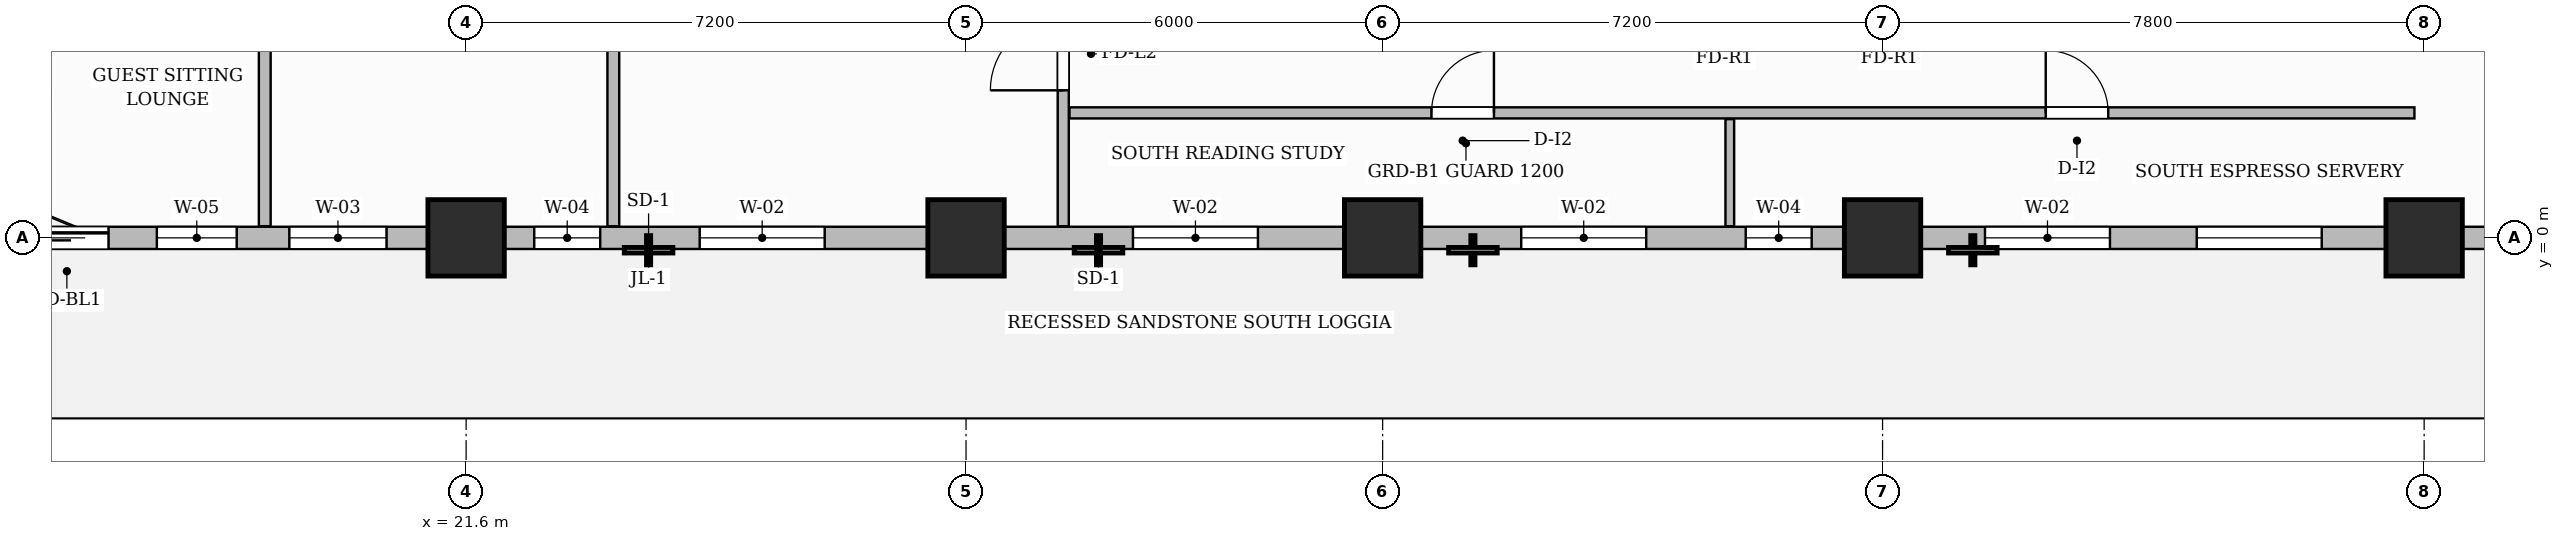
"""IFC4 building model, lengths in metres.
Left out: names, types, materials, properties, quantities, classifications, styles, units other than length and angle.
Written with IfcOpenShell. Run it as: python <this file> out.ifc"""

import sys

from ifc_helpers import new_model, si_unit, direction, frame, frame_2d, origin, origin_2d, place, context, subcontext, project, spatial, rectangle, extrude, source, transform, mapped, element, fill, save


model = new_model("IFC4")
c1 = context("Model", 3, precision=1e-05, world=origin(), true_north=direction((0.0, 1.0)))
c2 = subcontext(c1, "Body", "Model", "MODEL_VIEW")
j1 = project(units=[si_unit("LENGTHUNIT", "METRE"), si_unit("PLANEANGLEUNIT", "RADIAN")], contexts=[c1])
p1 = place(None, origin())
s1 = spatial("IfcSite", under=j1, at=p1, CompositionType="ELEMENT")
p2 = place(p1, origin())
s2 = spatial("IfcBuilding", under=s1, at=p2, CompositionType="ELEMENT")
p3 = place(p2, frame((0.0, 0.0, 99.0)))
s3 = spatial("IfcBuildingStorey", under=s2, at=p3, CompositionType="ELEMENT", Elevation=99.0)
m1 = source(origin(), c2, "Body", "SweptSolid", [
    extrude(rectangle(XDim=1.1, YDim=1.1, at=origin_2d()), origin(), (0.0, 0.0, 1.0), 3.7),
])
for number, where, z_axis, x_axis in (
    (1, (21.6, 0.0, 0.0), (0.0, 0.0, 1.0), (1.0, 0.0, 0.0)),
    (2, (28.8, 0.0, 0.0), (0.0, 0.0, 1.0), (1.0, 0.0, 0.0)),
    (3, (34.8, 0.0, 0.0), (0.0, 0.0, 1.0), (1.0, 0.0, 0.0)),
    (4, (42.0, 0.0, 0.0), (0.0, 0.0, 1.0), (1.0, 0.0, 0.0)),
    (5, (49.8, 0.0, 0.0), (0.0, 0.0, 1.0), (1.0, 0.0, 0.0)),
):
    element("IfcColumn", number, at=place(p3, frame(where, z_axis=z_axis, x_axis=x_axis)), inside=s3, PredefinedType="COLUMN", context=c2, shape_type="MappedRepresentation", body=[
        mapped(m1, transform((0.0, 0.0, 0.0), scale=1.0)),
    ])
p4 = place(p3, frame((30.2, 0.168, 0.0), z_axis=(0.0, 0.0, 1.0), x_axis=(0.0, 1.0, 0.0)))
e6 = element("IfcWall", 6, at=p4, inside=s3, PredefinedType="PARTITIONING", context=c2, shape_type="SweptSolid", body=[
    extrude(rectangle(XDim=8.892, YDim=0.16, at=frame_2d((4.446, 0.0))), origin(), (0.0, 0.0, 1.0), 3.45),
])
p5 = place(p4, frame((1.957, 0.0, 0.0)))
e7 = element("IfcOpeningElement", 7, at=p5, cuts=e6, PredefinedType="OPENING", context=c2, shape_type="SweptSolid", body=[
    extrude(rectangle(XDim=1.05, YDim=2.15, at=frame_2d((0.525, 1.075))), frame((0.0, 0.09, 0.0), z_axis=(0.0, -1.0, 0.0), x_axis=(1.0, 0.0, 0.0)), (0.0, 0.0, 1.0), 0.18),
])
p6 = place(p3, frame((30.29, 1.8, 0.0), z_axis=(0.0, 0.0, 1.0), x_axis=(1.0, 0.0, 0.0)))
e8 = element("IfcWall", 8, at=p6, inside=s3, PredefinedType="PARTITIONING", context=c2, shape_type="SweptSolid", body=[
    extrude(rectangle(XDim=19.37, YDim=0.16, at=frame_2d((9.685, 0.0))), origin(), (0.0, 0.0, 1.0), 3.45),
])
p7 = place(p6, frame((5.213, 0.0, 0.0)))
e9 = element("IfcOpeningElement", 9, at=p7, cuts=e8, PredefinedType="OPENING", context=c2, shape_type="SweptSolid", body=[
    extrude(rectangle(XDim=0.9, YDim=2.15, at=frame_2d((0.45, 1.075))), frame((0.0, 0.09, 0.0), z_axis=(0.0, -1.0, 0.0), x_axis=(1.0, 0.0, 0.0)), (0.0, 0.0, 1.0), 0.18),
])
p8 = place(p6, frame((14.06, 0.0, 0.0)))
e10 = element("IfcOpeningElement", 10, at=p8, cuts=e8, PredefinedType="OPENING", context=c2, shape_type="SweptSolid", body=[
    extrude(rectangle(XDim=0.9, YDim=2.15, at=frame_2d((0.45, 1.075))), frame((0.0, 0.09, 0.0), z_axis=(0.0, -1.0, 0.0), x_axis=(1.0, 0.0, 0.0)), (0.0, 0.0, 1.0), 0.18),
])
p9 = place(p3, frame((39.8, 0.168, 0.0), z_axis=(0.0, 0.0, 1.0), x_axis=(0.0, 1.0, 0.0)))
e11 = element("IfcWall", 11, at=p9, inside=s3, PredefinedType="PARTITIONING", context=c2, shape_type="SweptSolid", body=[
    extrude(rectangle(XDim=1.542, YDim=0.125, at=frame_2d((0.771, 0.0))), origin(), (0.0, 0.0, 1.0), 3.45),
])
for number, where, z_axis, x_axis in (
    (12, (18.7, 0.168, 0.0), (0.0, 0.0, 1.0), (0.0, 1.0, 0.0)),
    (13, (23.72, 0.168, 0.0), (0.0, 0.0, 1.0), (0.0, 1.0, 0.0)),
):
    element("IfcWall", number, at=place(p3, frame(where, z_axis=z_axis, x_axis=x_axis)), inside=s3, PredefinedType="PARTITIONING", context=c2, shape_type="SweptSolid", body=[
        extrude(rectangle(XDim=8.892, YDim=0.17, at=frame_2d((4.446, 0.0))), origin(), (0.0, 0.0, 1.0), 3.45),
    ])
p10 = place(p3, frame((14.4, 0.0, 0.0), z_axis=(0.0, 0.0, 1.0), x_axis=(1.0, 0.0, 0.0)))
e14 = element("IfcWall", 14, at=p10, inside=s3, PredefinedType="SOLIDWALL", context=c2, shape_type="SweptSolid", body=[
    extrude(rectangle(XDim=43.2, YDim=0.32, at=frame_2d((21.6, 0.0))), origin(), (0.0, 0.0, 1.0), 2.885),
])
p11 = place(p10, frame((0.85, 0.0, 0.0)))
e15 = element("IfcOpeningElement", 15, at=p11, cuts=e14, PredefinedType="OPENING", context=c2, shape_type="SweptSolid", body=[
    extrude(rectangle(XDim=1.2, YDim=2.2, at=frame_2d((0.6, 1.1))), frame((0.0, 0.17, 0.0), z_axis=(0.0, -1.0, 0.0), x_axis=(1.0, 0.0, 0.0)), (0.0, 0.0, 1.0), 0.34),
])
p12 = place(p10, frame((2.746, 0.0, 0.8)))
e16 = element("IfcOpeningElement", 16, at=p12, cuts=e14, PredefinedType="OPENING", context=c2, shape_type="SweptSolid", body=[
    extrude(rectangle(XDim=1.15, YDim=1.8, at=frame_2d((0.575, 0.9))), frame((0.0, 0.17, 0.0), z_axis=(0.0, -1.0, 0.0), x_axis=(1.0, 0.0, 0.0)), (0.0, 0.0, 1.0), 0.34),
])
p13 = place(p10, frame((4.654, 0.0, 0.8)))
e17 = element("IfcOpeningElement", 17, at=p13, cuts=e14, PredefinedType="OPENING", context=c2, shape_type="SweptSolid", body=[
    extrude(rectangle(XDim=1.4, YDim=1.85, at=frame_2d((0.7, 0.925))), frame((0.0, 0.17, 0.0), z_axis=(0.0, -1.0, 0.0), x_axis=(1.0, 0.0, 0.0)), (0.0, 0.0, 1.0), 0.34),
])
p14 = place(p10, frame((8.181, 0.0, 0.8)))
e18 = element("IfcOpeningElement", 18, at=p14, cuts=e14, PredefinedType="OPENING", context=c2, shape_type="SweptSolid", body=[
    extrude(rectangle(XDim=0.95, YDim=1.75, at=frame_2d((0.475, 0.875))), frame((0.0, 0.17, 0.0), z_axis=(0.0, -1.0, 0.0), x_axis=(1.0, 0.0, 0.0)), (0.0, 0.0, 1.0), 0.34),
])
p15 = place(p10, frame((10.564, 0.0, 0.8)))
e19 = element("IfcOpeningElement", 19, at=p15, cuts=e14, PredefinedType="OPENING", context=c2, shape_type="SweptSolid", body=[
    extrude(rectangle(XDim=1.8, YDim=1.85, at=frame_2d((0.9, 0.925))), frame((0.0, 0.17, 0.0), z_axis=(0.0, -1.0, 0.0), x_axis=(1.0, 0.0, 0.0)), (0.0, 0.0, 1.0), 0.34),
])
p16 = place(p10, frame((16.804, 0.0, 0.8)))
e20 = element("IfcOpeningElement", 20, at=p16, cuts=e14, PredefinedType="OPENING", context=c2, shape_type="SweptSolid", body=[
    extrude(rectangle(XDim=1.8, YDim=1.85, at=frame_2d((0.9, 0.925))), frame((0.0, 0.17, 0.0), z_axis=(0.0, -1.0, 0.0), x_axis=(1.0, 0.0, 0.0)), (0.0, 0.0, 1.0), 0.34),
])
p17 = place(p10, frame((22.396, 0.0, 0.8)))
e21 = element("IfcOpeningElement", 21, at=p17, cuts=e14, PredefinedType="OPENING", context=c2, shape_type="SweptSolid", body=[
    extrude(rectangle(XDim=1.8, YDim=1.85, at=frame_2d((0.9, 0.925))), frame((0.0, 0.17, 0.0), z_axis=(0.0, -1.0, 0.0), x_axis=(1.0, 0.0, 0.0)), (0.0, 0.0, 1.0), 0.34),
])
p18 = place(p10, frame((25.629, 0.0, 0.8)))
e22 = element("IfcOpeningElement", 22, at=p18, cuts=e14, PredefinedType="OPENING", context=c2, shape_type="SweptSolid", body=[
    extrude(rectangle(XDim=0.95, YDim=1.75, at=frame_2d((0.475, 0.875))), frame((0.0, 0.17, 0.0), z_axis=(0.0, -1.0, 0.0), x_axis=(1.0, 0.0, 0.0)), (0.0, 0.0, 1.0), 0.34),
])
p19 = place(p10, frame((29.075, 0.0, 0.8)))
e23 = element("IfcOpeningElement", 23, at=p19, cuts=e14, PredefinedType="OPENING", context=c2, shape_type="SweptSolid", body=[
    extrude(rectangle(XDim=1.8, YDim=1.85, at=frame_2d((0.9, 0.925))), frame((0.0, 0.17, 0.0), z_axis=(0.0, -1.0, 0.0), x_axis=(1.0, 0.0, 0.0)), (0.0, 0.0, 1.0), 0.34),
])
p20 = place(p10, frame((32.125, 0.0, 0.8)))
e24 = element("IfcOpeningElement", 24, at=p20, cuts=e14, PredefinedType="OPENING", context=c2, shape_type="SweptSolid", body=[
    extrude(rectangle(XDim=1.8, YDim=1.85, at=frame_2d((0.9, 0.925))), frame((0.0, 0.17, 0.0), z_axis=(0.0, -1.0, 0.0), x_axis=(1.0, 0.0, 0.0)), (0.0, 0.0, 1.0), 0.34),
])
p21 = place(p10, frame((36.946, 0.0, 0.8)))
e25 = element("IfcOpeningElement", 25, at=p21, cuts=e14, PredefinedType="OPENING", context=c2, shape_type="SweptSolid", body=[
    extrude(rectangle(XDim=1.8, YDim=1.85, at=frame_2d((0.9, 0.925))), frame((0.0, 0.17, 0.0), z_axis=(0.0, -1.0, 0.0), x_axis=(1.0, 0.0, 0.0)), (0.0, 0.0, 1.0), 0.34),
])
p22 = place(p10, frame((40.054, 0.0, 0.8)))
e26 = element("IfcOpeningElement", 26, at=p22, cuts=e14, PredefinedType="OPENING", context=c2, shape_type="SweptSolid", body=[
    extrude(rectangle(XDim=1.8, YDim=1.85, at=frame_2d((0.9, 0.925))), frame((0.0, 0.17, 0.0), z_axis=(0.0, -1.0, 0.0), x_axis=(1.0, 0.0, 0.0)), (0.0, 0.0, 1.0), 0.34),
])
m2 = source(origin(), c2, "Body", "SweptSolid", [
    extrude(rectangle(XDim=1.05, YDim=2.15, at=frame_2d((0.525, 1.075))), frame((0.0, 0.025, 0.0), z_axis=(0.0, -1.0, 0.0), x_axis=(1.0, 0.0, 0.0)), (0.0, 0.0, 1.0), 0.05),
])
p23 = place(p5, origin())
e27 = element("IfcDoor", 27, at=p23, inside=s3, OperationType="SINGLE_SWING_LEFT", PredefinedType="DOOR", context=c2, shape_type="MappedRepresentation", body=[
    mapped(m2, transform((0.0, 0.0, 0.0), scale=1.0)),
])
fill(e7, e27)
m3 = source(origin(), c2, "Body", "SweptSolid", [
    extrude(rectangle(XDim=0.9, YDim=2.15, at=frame_2d((0.45, 1.075))), frame((0.0, 0.025, 0.0), z_axis=(0.0, -1.0, 0.0), x_axis=(1.0, 0.0, 0.0)), (0.0, 0.0, 1.0), 0.05),
])
p24 = place(p7, origin())
e28 = element("IfcDoor", 28, at=p24, inside=s3, OperationType="SINGLE_SWING_RIGHT", PredefinedType="DOOR", context=c2, shape_type="MappedRepresentation", body=[
    mapped(m3, transform((0.0, 0.0, 0.0), scale=1.0)),
])
fill(e9, e28)
p25 = place(p8, origin())
e29 = element("IfcDoor", 29, at=p25, inside=s3, OperationType="SINGLE_SWING_LEFT", PredefinedType="DOOR", context=c2, shape_type="MappedRepresentation", body=[
    mapped(m3, transform((0.0, 0.0, 0.0), scale=1.0)),
])
fill(e10, e29)
m4 = source(origin(), c2, "Body", "SweptSolid", [
    extrude(rectangle(XDim=1.2, YDim=2.2, at=frame_2d((0.6, 1.1))), frame((0.0, 0.025, 0.0), z_axis=(0.0, -1.0, 0.0), x_axis=(1.0, 0.0, 0.0)), (0.0, 0.0, 1.0), 0.05),
])
p26 = place(p11, origin())
e30 = element("IfcDoor", 30, at=p26, inside=s3, OperationType="SLIDING_TO_LEFT", PredefinedType="DOOR", context=c2, shape_type="MappedRepresentation", body=[
    mapped(m4, transform((0.0, 0.0, 0.0), scale=1.0)),
])
fill(e15, e30)
m5 = source(origin(), c2, "Body", "SweptSolid", [
    extrude(rectangle(XDim=1.15, YDim=1.8, at=frame_2d((0.575, 0.9))), frame((0.0, 0.03, 0.0), z_axis=(0.0, -1.0, 0.0), x_axis=(1.0, 0.0, 0.0)), (0.0, 0.0, 1.0), 0.06),
])
p27 = place(p12, origin())
e31 = element("IfcWindow", 31, at=p27, inside=s3, PartitioningType="SINGLE_PANEL", PredefinedType="WINDOW", context=c2, shape_type="MappedRepresentation", body=[
    mapped(m5, transform((0.0, 0.0, 0.0), scale=1.0)),
])
fill(e16, e31)
m6 = source(origin(), c2, "Body", "SweptSolid", [
    extrude(rectangle(XDim=1.4, YDim=1.85, at=frame_2d((0.7, 0.925))), frame((0.0, 0.03, 0.0), z_axis=(0.0, -1.0, 0.0), x_axis=(1.0, 0.0, 0.0)), (0.0, 0.0, 1.0), 0.06),
])
p28 = place(p13, origin())
e32 = element("IfcWindow", 32, at=p28, inside=s3, PartitioningType="SINGLE_PANEL", PredefinedType="WINDOW", context=c2, shape_type="MappedRepresentation", body=[
    mapped(m6, transform((0.0, 0.0, 0.0), scale=1.0)),
])
fill(e17, e32)
m7 = source(origin(), c2, "Body", "SweptSolid", [
    extrude(rectangle(XDim=0.95, YDim=1.75, at=frame_2d((0.475, 0.875))), frame((0.0, 0.03, 0.0), z_axis=(0.0, -1.0, 0.0), x_axis=(1.0, 0.0, 0.0)), (0.0, 0.0, 1.0), 0.06),
])
p29 = place(p14, origin())
e33 = element("IfcWindow", 33, at=p29, inside=s3, PartitioningType="SINGLE_PANEL", PredefinedType="WINDOW", context=c2, shape_type="MappedRepresentation", body=[
    mapped(m7, transform((0.0, 0.0, 0.0), scale=1.0)),
])
fill(e18, e33)
m8 = source(origin(), c2, "Body", "SweptSolid", [
    extrude(rectangle(XDim=1.8, YDim=1.85, at=frame_2d((0.9, 0.925))), frame((0.0, 0.03, 0.0), z_axis=(0.0, -1.0, 0.0), x_axis=(1.0, 0.0, 0.0)), (0.0, 0.0, 1.0), 0.06),
])
p30 = place(p15, origin())
e34 = element("IfcWindow", 34, at=p30, inside=s3, PartitioningType="DOUBLE_PANEL_VERTICAL", PredefinedType="WINDOW", context=c2, shape_type="MappedRepresentation", body=[
    mapped(m8, transform((0.0, 0.0, 0.0), scale=1.0)),
])
fill(e19, e34)
p31 = place(p16, origin())
e35 = element("IfcWindow", 35, at=p31, inside=s3, PartitioningType="DOUBLE_PANEL_VERTICAL", PredefinedType="WINDOW", context=c2, shape_type="MappedRepresentation", body=[
    mapped(m8, transform((0.0, 0.0, 0.0), scale=1.0)),
])
fill(e20, e35)
p32 = place(p17, origin())
e36 = element("IfcWindow", 36, at=p32, inside=s3, PartitioningType="DOUBLE_PANEL_VERTICAL", PredefinedType="WINDOW", context=c2, shape_type="MappedRepresentation", body=[
    mapped(m8, transform((0.0, 0.0, 0.0), scale=1.0)),
])
fill(e21, e36)
p33 = place(p18, origin())
e37 = element("IfcWindow", 37, at=p33, inside=s3, PartitioningType="SINGLE_PANEL", PredefinedType="WINDOW", context=c2, shape_type="MappedRepresentation", body=[
    mapped(m7, transform((0.0, 0.0, 0.0), scale=1.0)),
])
fill(e22, e37)
p34 = place(p19, origin())
e38 = element("IfcWindow", 38, at=p34, inside=s3, PartitioningType="DOUBLE_PANEL_VERTICAL", PredefinedType="WINDOW", context=c2, shape_type="MappedRepresentation", body=[
    mapped(m8, transform((0.0, 0.0, 0.0), scale=1.0)),
])
fill(e23, e38)
p35 = place(p20, origin())
e39 = element("IfcWindow", 39, at=p35, inside=s3, PartitioningType="DOUBLE_PANEL_VERTICAL", PredefinedType="WINDOW", context=c2, shape_type="MappedRepresentation", body=[
    mapped(m8, transform((0.0, 0.0, 0.0), scale=1.0)),
])
fill(e24, e39)
save(model, sys.argv[1])
